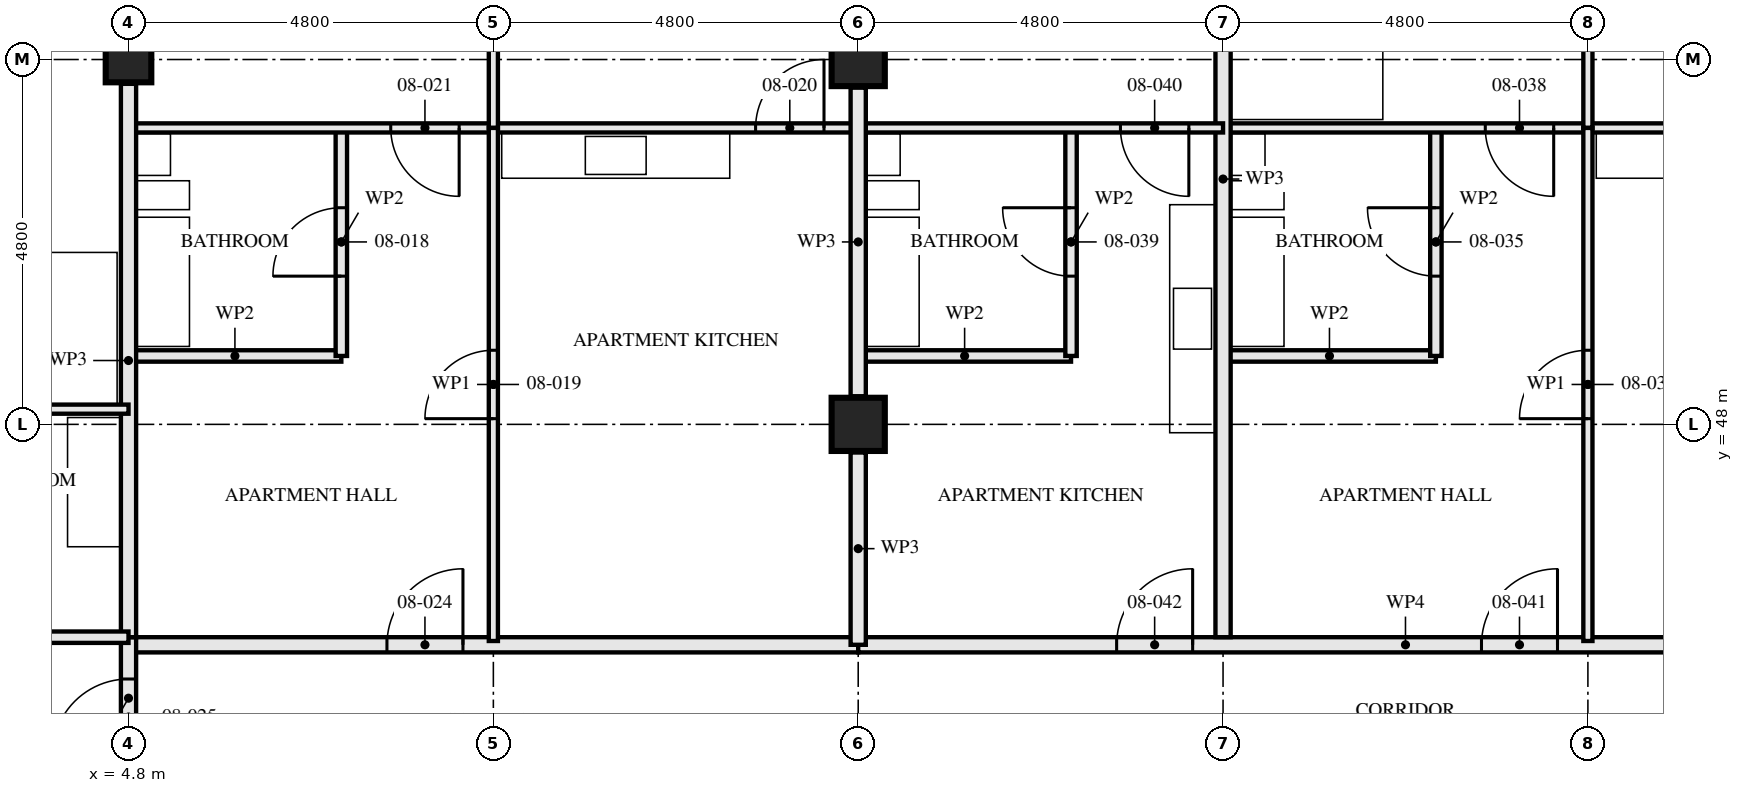
"""IFC4 building model, lengths in metres.
Left out: names, types, materials, properties, quantities, classifications, styles, units other than length and angle.
Written with IfcOpenShell. Run it as: python <this file> out.ifc"""

import sys

from ifc_helpers import new_model, si_unit, direction, frame, frame_2d, origin, origin_2d, place, context, subcontext, project, spatial, rectangle, hollow_rectangle, extrude, element, fill, save


model = new_model("IFC4")
c1 = context("Model", 3, precision=1e-05, world=origin(), true_north=direction((0.0, 1.0)))
c2 = subcontext(c1, "Body", "Model", "MODEL_VIEW")
j1 = project(units=[si_unit("LENGTHUNIT", "METRE"), si_unit("PLANEANGLEUNIT", "RADIAN")], contexts=[c1])
p1 = place(None, origin())
s1 = spatial("IfcSite", under=j1, at=p1, CompositionType="ELEMENT")
p2 = place(p1, origin())
s2 = spatial("IfcBuilding", under=s1, at=p2, CompositionType="ELEMENT")
p3 = place(p2, frame((0.0, 0.0, 34.0)))
s3 = spatial("IfcBuildingStorey", under=s2, at=p3, CompositionType="ELEMENT", Elevation=34.0)
p4 = place(p3, frame((4.8, 52.8, 0.0), z_axis=(0.0, 0.0, 1.0), x_axis=(0.0, 1.0, 0.0)))
e1 = element("IfcColumn", 1, at=p4, inside=s3, PredefinedType="COLUMN", context=c2, shape_type="SweptSolid", body=[
    extrude(hollow_rectangle(XDim=0.6, YDim=0.6, WallThickness=0.08, at=origin_2d()), origin(), (0.0, 0.0, 1.0), 3.5),
])
for number, where, z_axis, x_axis in (
    (2, (14.4, 48.0, 0.0), (0.0, 0.0, 1.0), (1.0, 0.0, 0.0)),
    (3, (14.4, 52.8, 0.0), (0.0, 0.0, 1.0), (1.0, 0.0, 0.0)),
):
    element("IfcColumn", number, at=place(p3, frame(where, z_axis=z_axis, x_axis=x_axis)), inside=s3, PredefinedType="COLUMN", context=c2, shape_type="SweptSolid", body=[
        extrude(hollow_rectangle(XDim=0.7, YDim=0.7, WallThickness=0.06, at=origin_2d()), origin(), (0.0, 0.0, 1.0), 3.5),
    ])
p5 = place(p3, frame((7.6, 51.9, 0.0), z_axis=(0.0, 0.0, 1.0), x_axis=(0.0, -1.0, 0.0)))
e4 = element("IfcWall", 4, at=p5, inside=s3, PredefinedType="PARTITIONING", context=c2, shape_type="SweptSolid", body=[
    extrude(rectangle(XDim=3.0, YDim=0.15, at=frame_2d((1.5, 0.0))), origin(), (0.0, 0.0, 1.0), 3.33),
])
p6 = place(p5, frame((1.05, 0.0, 0.0)))
e5 = element("IfcOpeningElement", 5, at=p6, cuts=e4, PredefinedType="OPENING", context=c2, shape_type="SweptSolid", body=[
    extrude(rectangle(XDim=0.9, YDim=2.1, at=frame_2d((0.45, 1.05))), frame((0.0, 0.085, 0.0), z_axis=(0.0, -1.0, 0.0), x_axis=(1.0, 0.0, 0.0)), (0.0, 0.0, 1.0), 0.171),
])
p7 = place(p3, frame((7.6, 48.9, 0.0), z_axis=(0.0, 0.0, 1.0), x_axis=(-1.0, 0.0, 0.0)))
e6 = element("IfcWall", 6, at=p7, inside=s3, PredefinedType="PARTITIONING", context=c2, shape_type="SweptSolid", body=[
    extrude(rectangle(XDim=2.8, YDim=0.15, at=frame_2d((1.4, 0.0))), origin(), (0.0, 0.0, 1.0), 3.33),
])
p8 = place(p3, frame((9.6, 51.9, 0.0), z_axis=(0.0, 0.0, 1.0), x_axis=(0.0, -1.0, 0.0)))
e7 = element("IfcWall", 7, at=p8, inside=s3, PredefinedType="PARTITIONING", context=c2, shape_type="SweptSolid", body=[
    extrude(rectangle(XDim=6.75, YDim=0.12, at=frame_2d((3.375, 0.0))), origin(), (0.0, 0.0, 1.0), 2.55),
])
p9 = place(p8, frame((2.925, 0.0, 0.0)))
e8 = element("IfcOpeningElement", 8, at=p9, cuts=e7, PredefinedType="OPENING", context=c2, shape_type="SweptSolid", body=[
    extrude(rectangle(XDim=0.9, YDim=2.1, at=frame_2d((0.45, 1.05))), frame((0.0, 0.071, 0.0), z_axis=(0.0, -1.0, 0.0), x_axis=(1.0, 0.0, 0.0)), (0.0, 0.0, 1.0), 0.141),
])
p10 = place(p3, frame((14.4, 51.9, 0.0), z_axis=(0.0, 0.0, 1.0), x_axis=(-1.0, 0.0, 0.0)))
e9 = element("IfcWall", 9, at=p10, inside=s3, PredefinedType="PARTITIONING", context=c2, shape_type="SweptSolid", body=[
    extrude(rectangle(XDim=4.8, YDim=0.12, at=frame_2d((2.4, 0.0))), origin(), (0.0, 0.0, 1.0), 3.33),
])
p11 = place(p10, frame((0.45, 0.0, 0.0)))
e10 = element("IfcOpeningElement", 10, at=p11, cuts=e9, PredefinedType="OPENING", context=c2, shape_type="SweptSolid", body=[
    extrude(rectangle(XDim=0.9, YDim=2.1, at=frame_2d((0.45, 1.05))), frame((0.0, 0.071, 0.0), z_axis=(0.0, -1.0, 0.0), x_axis=(1.0, 0.0, 0.0)), (0.0, 0.0, 1.0), 0.141),
])
p12 = place(p3, frame((9.6, 51.9, 0.0), z_axis=(0.0, 0.0, 1.0), x_axis=(-1.0, 0.0, 0.0)))
e11 = element("IfcWall", 11, at=p12, inside=s3, PredefinedType="PARTITIONING", context=c2, shape_type="SweptSolid", body=[
    extrude(rectangle(XDim=4.8, YDim=0.12, at=frame_2d((2.4, 0.0))), origin(), (0.0, 0.0, 1.0), 3.33),
])
p13 = place(p12, frame((0.45, 0.0, 0.0)))
e12 = element("IfcOpeningElement", 12, at=p13, cuts=e11, PredefinedType="OPENING", context=c2, shape_type="SweptSolid", body=[
    extrude(rectangle(XDim=0.9, YDim=2.1, at=frame_2d((0.45, 1.05))), frame((0.0, 0.071, 0.0), z_axis=(0.0, -1.0, 0.0), x_axis=(1.0, 0.0, 0.0)), (0.0, 0.0, 1.0), 0.141),
])
p14 = place(p3, frame((9.6, 57.28, 0.0), z_axis=(0.0, 0.0, 1.0), x_axis=(0.0, -1.0, 0.0)))
e13 = element("IfcWall", 13, at=p14, inside=s3, PredefinedType="PARTITIONING", context=c2, shape_type="SweptSolid", body=[
    extrude(rectangle(XDim=5.38, YDim=0.12, at=frame_2d((2.69, 0.0))), origin(), (0.0, 0.0, 1.0), 2.55),
])
p15 = place(p3, frame((4.8, 52.48, 0.0), z_axis=(0.0, 0.0, 1.0), x_axis=(0.0, -1.0, 0.0)))
e14 = element("IfcWall", 14, at=p15, inside=s3, PredefinedType="PARTITIONING", context=c2, shape_type="SweptSolid", body=[
    extrude(rectangle(XDim=7.28, YDim=0.2, at=frame_2d((3.64, 0.0))), origin(), (0.0, 0.0, 1.0), 2.55),
])
p16 = place(p3, frame((4.8, 45.2, 0.0), z_axis=(0.0, 0.0, 1.0), x_axis=(-1.0, 0.0, 0.0)))
e15 = element("IfcWall", 15, at=p16, inside=s3, PredefinedType="PARTITIONING", context=c2, shape_type="SweptSolid", body=[
    extrude(rectangle(XDim=2.8, YDim=0.15, at=frame_2d((1.4, 0.0))), origin(), (0.0, 0.0, 1.0), 3.33),
])
p17 = place(p3, frame((4.8, 48.2, 0.0), z_axis=(0.0, 0.0, 1.0), x_axis=(-1.0, 0.0, 0.0)))
e16 = element("IfcWall", 16, at=p17, inside=s3, PredefinedType="PARTITIONING", context=c2, shape_type="SweptSolid", body=[
    extrude(rectangle(XDim=4.48, YDim=0.12, at=frame_2d((2.24, 0.0))), origin(), (0.0, 0.0, 1.0), 3.33),
])
p18 = place(p17, frame((2.975, 0.0, 0.0)))
e17 = element("IfcOpeningElement", 17, at=p18, cuts=e16, PredefinedType="OPENING", context=c2, shape_type="SweptSolid", body=[
    extrude(rectangle(XDim=0.9, YDim=2.1, at=frame_2d((0.45, 1.05))), frame((0.0, 0.071, 0.0), z_axis=(0.0, -1.0, 0.0), x_axis=(1.0, 0.0, 0.0)), (0.0, 0.0, 1.0), 0.141),
])
p19 = place(p3, frame((14.4, 45.1, 0.0), z_axis=(0.0, 0.0, 1.0), x_axis=(-1.0, 0.0, 0.0)))
e18 = element("IfcWall", 18, at=p19, inside=s3, PredefinedType="PARTITIONING", context=c2, shape_type="SweptSolid", body=[
    extrude(rectangle(XDim=9.6, YDim=0.2, at=frame_2d((4.8, 0.0))), origin(), (0.0, 0.0, 1.0), 3.33),
])
p20 = place(p19, frame((5.2, 0.0, 0.0)))
e19 = element("IfcOpeningElement", 19, at=p20, cuts=e18, PredefinedType="OPENING", context=c2, shape_type="SweptSolid", body=[
    extrude(rectangle(XDim=1.0, YDim=2.1, at=frame_2d((0.5, 1.05))), frame((0.0, 0.111, 0.0), z_axis=(0.0, -1.0, 0.0), x_axis=(1.0, 0.0, 0.0)), (0.0, 0.0, 1.0), 0.221),
])
p21 = place(p3, frame((4.8, 45.2, 0.0), z_axis=(0.0, 0.0, 1.0), x_axis=(0.0, -1.0, 0.0)))
e20 = element("IfcWall", 20, at=p21, inside=s3, PredefinedType="PARTITIONING", context=c2, shape_type="SweptSolid", body=[
    extrude(rectangle(XDim=1.605, YDim=0.2, at=frame_2d((0.802, 0.0))), origin(), (0.0, 0.0, 1.0), 3.33),
])
p22 = place(p21, frame((0.55, 0.0, 0.0)))
e21 = element("IfcOpeningElement", 21, at=p22, cuts=e20, PredefinedType="OPENING", context=c2, shape_type="SweptSolid", body=[
    extrude(rectangle(XDim=1.0, YDim=2.1, at=frame_2d((0.5, 1.05))), frame((0.0, 0.111, 0.0), z_axis=(0.0, -1.0, 0.0), x_axis=(1.0, 0.0, 0.0)), (0.0, 0.0, 1.0), 0.221),
])
p23 = place(p3, frame((22.0, 51.9, 0.0), z_axis=(0.0, 0.0, 1.0), x_axis=(0.0, -1.0, 0.0)))
e22 = element("IfcWall", 22, at=p23, inside=s3, PredefinedType="PARTITIONING", context=c2, shape_type="SweptSolid", body=[
    extrude(rectangle(XDim=3.0, YDim=0.15, at=frame_2d((1.5, 0.0))), origin(), (0.0, 0.0, 1.0), 3.33),
])
p24 = place(p23, frame((1.05, 0.0, 0.0)))
e23 = element("IfcOpeningElement", 23, at=p24, cuts=e22, PredefinedType="OPENING", context=c2, shape_type="SweptSolid", body=[
    extrude(rectangle(XDim=0.9, YDim=2.1, at=frame_2d((0.45, 1.05))), frame((0.0, 0.085, 0.0), z_axis=(0.0, -1.0, 0.0), x_axis=(1.0, 0.0, 0.0)), (0.0, 0.0, 1.0), 0.171),
])
p25 = place(p3, frame((22.0, 48.9, 0.0), z_axis=(0.0, 0.0, 1.0), x_axis=(-1.0, 0.0, 0.0)))
e24 = element("IfcWall", 24, at=p25, inside=s3, PredefinedType="PARTITIONING", context=c2, shape_type="SweptSolid", body=[
    extrude(rectangle(XDim=2.8, YDim=0.15, at=frame_2d((1.4, 0.0))), origin(), (0.0, 0.0, 1.0), 3.33),
])
p26 = place(p3, frame((24.0, 51.9, 0.0), z_axis=(0.0, 0.0, 1.0), x_axis=(0.0, -1.0, 0.0)))
e25 = element("IfcWall", 25, at=p26, inside=s3, PredefinedType="PARTITIONING", context=c2, shape_type="SweptSolid", body=[
    extrude(rectangle(XDim=6.75, YDim=0.12, at=frame_2d((3.375, 0.0))), origin(), (0.0, 0.0, 1.0), 2.55),
])
p27 = place(p26, frame((2.925, 0.0, 0.0)))
e26 = element("IfcOpeningElement", 26, at=p27, cuts=e25, PredefinedType="OPENING", context=c2, shape_type="SweptSolid", body=[
    extrude(rectangle(XDim=0.9, YDim=2.1, at=frame_2d((0.45, 1.05))), frame((0.0, 0.071, 0.0), z_axis=(0.0, -1.0, 0.0), x_axis=(1.0, 0.0, 0.0)), (0.0, 0.0, 1.0), 0.141),
])
p28 = place(p3, frame((28.8, 51.9, 0.0), z_axis=(0.0, 0.0, 1.0), x_axis=(-1.0, 0.0, 0.0)))
e27 = element("IfcWall", 27, at=p28, inside=s3, PredefinedType="PARTITIONING", context=c2, shape_type="SweptSolid", body=[
    extrude(rectangle(XDim=4.8, YDim=0.12, at=frame_2d((2.4, 0.0))), origin(), (0.0, 0.0, 1.0), 3.33),
])
p29 = place(p28, frame((0.45, 0.0, 0.0)))
e28 = element("IfcOpeningElement", 28, at=p29, cuts=e27, PredefinedType="OPENING", context=c2, shape_type="SweptSolid", body=[
    extrude(rectangle(XDim=0.9, YDim=2.1, at=frame_2d((0.45, 1.05))), frame((0.0, 0.071, 0.0), z_axis=(0.0, -1.0, 0.0), x_axis=(1.0, 0.0, 0.0)), (0.0, 0.0, 1.0), 0.141),
])
p30 = place(p3, frame((24.0, 51.9, 0.0), z_axis=(0.0, 0.0, 1.0), x_axis=(-1.0, 0.0, 0.0)))
e29 = element("IfcWall", 29, at=p30, inside=s3, PredefinedType="PARTITIONING", context=c2, shape_type="SweptSolid", body=[
    extrude(rectangle(XDim=4.8, YDim=0.12, at=frame_2d((2.4, 0.0))), origin(), (0.0, 0.0, 1.0), 3.33),
])
p31 = place(p30, frame((0.45, 0.0, 0.0)))
e30 = element("IfcOpeningElement", 30, at=p31, cuts=e29, PredefinedType="OPENING", context=c2, shape_type="SweptSolid", body=[
    extrude(rectangle(XDim=0.9, YDim=2.1, at=frame_2d((0.45, 1.05))), frame((0.0, 0.071, 0.0), z_axis=(0.0, -1.0, 0.0), x_axis=(1.0, 0.0, 0.0)), (0.0, 0.0, 1.0), 0.141),
])
p32 = place(p3, frame((24.0, 57.255, 0.0), z_axis=(0.0, 0.0, 1.0), x_axis=(0.0, -1.0, 0.0)))
e31 = element("IfcWall", 31, at=p32, inside=s3, PredefinedType="PARTITIONING", context=c2, shape_type="SweptSolid", body=[
    extrude(rectangle(XDim=5.355, YDim=0.12, at=frame_2d((2.677, 0.0))), origin(), (0.0, 0.0, 1.0), 2.55),
])
p33 = place(p3, frame((19.2, 57.255, 0.0), z_axis=(0.0, 0.0, 1.0), x_axis=(0.0, -1.0, 0.0)))
e32 = element("IfcWall", 32, at=p33, inside=s3, PredefinedType="PARTITIONING", context=c2, shape_type="SweptSolid", body=[
    extrude(rectangle(XDim=12.055, YDim=0.2, at=frame_2d((6.027, 0.0))), origin(), (0.0, 0.0, 1.0), 2.55),
])
p34 = place(p3, frame((17.2, 51.9, 0.0), z_axis=(0.0, 0.0, 1.0), x_axis=(0.0, -1.0, 0.0)))
e33 = element("IfcWall", 33, at=p34, inside=s3, PredefinedType="PARTITIONING", context=c2, shape_type="SweptSolid", body=[
    extrude(rectangle(XDim=3.0, YDim=0.15, at=frame_2d((1.5, 0.0))), origin(), (0.0, 0.0, 1.0), 3.33),
])
p35 = place(p34, frame((1.05, 0.0, 0.0)))
e34 = element("IfcOpeningElement", 34, at=p35, cuts=e33, PredefinedType="OPENING", context=c2, shape_type="SweptSolid", body=[
    extrude(rectangle(XDim=0.9, YDim=2.1, at=frame_2d((0.45, 1.05))), frame((0.0, 0.085, 0.0), z_axis=(0.0, -1.0, 0.0), x_axis=(1.0, 0.0, 0.0)), (0.0, 0.0, 1.0), 0.171),
])
p36 = place(p3, frame((17.2, 48.9, 0.0), z_axis=(0.0, 0.0, 1.0), x_axis=(-1.0, 0.0, 0.0)))
e35 = element("IfcWall", 35, at=p36, inside=s3, PredefinedType="PARTITIONING", context=c2, shape_type="SweptSolid", body=[
    extrude(rectangle(XDim=2.8, YDim=0.15, at=frame_2d((1.4, 0.0))), origin(), (0.0, 0.0, 1.0), 3.33),
])
p37 = place(p3, frame((19.2, 51.9, 0.0), z_axis=(0.0, 0.0, 1.0), x_axis=(-1.0, 0.0, 0.0)))
e36 = element("IfcWall", 36, at=p37, inside=s3, PredefinedType="PARTITIONING", context=c2, shape_type="SweptSolid", body=[
    extrude(rectangle(XDim=4.8, YDim=0.12, at=frame_2d((2.4, 0.0))), origin(), (0.0, 0.0, 1.0), 3.33),
])
p38 = place(p37, frame((0.45, 0.0, 0.0)))
e37 = element("IfcOpeningElement", 37, at=p38, cuts=e36, PredefinedType="OPENING", context=c2, shape_type="SweptSolid", body=[
    extrude(rectangle(XDim=0.9, YDim=2.1, at=frame_2d((0.45, 1.05))), frame((0.0, 0.071, 0.0), z_axis=(0.0, -1.0, 0.0), x_axis=(1.0, 0.0, 0.0)), (0.0, 0.0, 1.0), 0.141),
])
p39 = place(p3, frame((28.8, 45.1, 0.0), z_axis=(0.0, 0.0, 1.0), x_axis=(-1.0, 0.0, 0.0)))
e38 = element("IfcWall", 38, at=p39, inside=s3, PredefinedType="PARTITIONING", context=c2, shape_type="SweptSolid", body=[
    extrude(rectangle(XDim=14.4, YDim=0.2, at=frame_2d((7.2, 0.0))), origin(), (0.0, 0.0, 1.0), 3.33),
])
p40 = place(p39, frame((5.2, 0.0, 0.0)))
e39 = element("IfcOpeningElement", 39, at=p40, cuts=e38, PredefinedType="OPENING", context=c2, shape_type="SweptSolid", body=[
    extrude(rectangle(XDim=1.0, YDim=2.1, at=frame_2d((0.5, 1.05))), frame((0.0, 0.111, 0.0), z_axis=(0.0, -1.0, 0.0), x_axis=(1.0, 0.0, 0.0)), (0.0, 0.0, 1.0), 0.221),
])
p41 = place(p39, frame((10.0, 0.0, 0.0)))
e40 = element("IfcOpeningElement", 40, at=p41, cuts=e38, PredefinedType="OPENING", context=c2, shape_type="SweptSolid", body=[
    extrude(rectangle(XDim=1.0, YDim=2.1, at=frame_2d((0.5, 1.05))), frame((0.0, 0.111, 0.0), z_axis=(0.0, -1.0, 0.0), x_axis=(1.0, 0.0, 0.0)), (0.0, 0.0, 1.0), 0.221),
])
p42 = place(p3, frame((14.4, 45.1, 0.0), z_axis=(0.0, 0.0, 1.0), x_axis=(0.0, 1.0, 0.0)))
e41 = element("IfcWall", 41, at=p42, inside=s3, PredefinedType="PARTITIONING", context=c2, shape_type="SweptSolid", body=[
    extrude(rectangle(XDim=2.53, YDim=0.2, at=frame_2d((1.265, 0.0))), origin(), (0.0, 0.0, 1.0), 2.32),
])
p43 = place(p3, frame((14.4, 48.37, 0.0), z_axis=(0.0, 0.0, 1.0), x_axis=(0.0, 1.0, 0.0)))
e42 = element("IfcWall", 42, at=p43, inside=s3, PredefinedType="PARTITIONING", context=c2, shape_type="SweptSolid", body=[
    extrude(rectangle(XDim=4.06, YDim=0.2, at=frame_2d((2.03, 0.0))), origin(), (0.0, 0.0, 1.0), 2.32),
])
p44 = place(p6, frame((0.9, 0.0, 0.0), z_axis=(0.0, 0.0, 1.0), x_axis=(-1.0, 0.0, 0.0)))
e43 = element("IfcDoor", 43, at=p44, inside=s3, OperationType="SINGLE_SWING_RIGHT", PredefinedType="DOOR", context=c2, shape_type="SweptSolid", body=[
    extrude(rectangle(XDim=0.9, YDim=2.1, at=frame_2d((0.45, 1.05))), frame((0.0, 0.022, 0.0), z_axis=(0.0, -1.0, 0.0), x_axis=(1.0, 0.0, 0.0)), (0.0, 0.0, 1.0), 0.044),
])
fill(e5, e43)
p45 = place(p9, frame((0.9, 0.0, 0.0), z_axis=(0.0, 0.0, 1.0), x_axis=(-1.0, 0.0, 0.0)))
e44 = element("IfcDoor", 44, at=p45, inside=s3, OperationType="SINGLE_SWING_RIGHT", PredefinedType="DOOR", context=c2, shape_type="SweptSolid", body=[
    extrude(rectangle(XDim=0.9, YDim=2.1, at=frame_2d((0.45, 1.05))), frame((0.0, 0.022, 0.0), z_axis=(0.0, -1.0, 0.0), x_axis=(1.0, 0.0, 0.0)), (0.0, 0.0, 1.0), 0.044),
])
fill(e8, e44)
p46 = place(p11, frame((0.9, 0.0, 0.0), z_axis=(0.0, 0.0, 1.0), x_axis=(-1.0, 0.0, 0.0)))
e45 = element("IfcDoor", 45, at=p46, inside=s3, OperationType="SINGLE_SWING_LEFT", PredefinedType="DOOR", context=c2, shape_type="SweptSolid", body=[
    extrude(rectangle(XDim=0.9, YDim=2.1, at=frame_2d((0.45, 1.05))), frame((0.0, 0.022, 0.0), z_axis=(0.0, -1.0, 0.0), x_axis=(1.0, 0.0, 0.0)), (0.0, 0.0, 1.0), 0.044),
])
fill(e10, e45)
p47 = place(p13, origin())
e46 = element("IfcDoor", 46, at=p47, inside=s3, OperationType="SINGLE_SWING_RIGHT", PredefinedType="DOOR", context=c2, shape_type="SweptSolid", body=[
    extrude(rectangle(XDim=0.9, YDim=2.1, at=frame_2d((0.45, 1.05))), frame((0.0, 0.022, 0.0), z_axis=(0.0, -1.0, 0.0), x_axis=(1.0, 0.0, 0.0)), (0.0, 0.0, 1.0), 0.044),
])
fill(e12, e46)
p48 = place(p20, frame((1.0, 0.0, 0.0), z_axis=(0.0, 0.0, 1.0), x_axis=(-1.0, 0.0, 0.0)))
e47 = element("IfcDoor", 47, at=p48, inside=s3, OperationType="SINGLE_SWING_LEFT", PredefinedType="DOOR", context=c2, shape_type="SweptSolid", body=[
    extrude(rectangle(XDim=1.0, YDim=2.1, at=frame_2d((0.5, 1.05))), frame((0.0, 0.027, 0.0), z_axis=(0.0, -1.0, 0.0), x_axis=(1.0, 0.0, 0.0)), (0.0, 0.0, 1.0), 0.054),
])
fill(e19, e47)
p49 = place(p22, frame((1.0, 0.0, 0.0), z_axis=(0.0, 0.0, 1.0), x_axis=(-1.0, 0.0, 0.0)))
e48 = element("IfcDoor", 48, at=p49, inside=s3, OperationType="SINGLE_SWING_RIGHT", PredefinedType="DOOR", context=c2, shape_type="SweptSolid", body=[
    extrude(rectangle(XDim=1.0, YDim=2.1, at=frame_2d((0.5, 1.05))), frame((0.0, 0.027, 0.0), z_axis=(0.0, -1.0, 0.0), x_axis=(1.0, 0.0, 0.0)), (0.0, 0.0, 1.0), 0.054),
])
fill(e21, e48)
p50 = place(p24, frame((0.9, 0.0, 0.0), z_axis=(0.0, 0.0, 1.0), x_axis=(-1.0, 0.0, 0.0)))
e49 = element("IfcDoor", 49, at=p50, inside=s3, OperationType="SINGLE_SWING_LEFT", PredefinedType="DOOR", context=c2, shape_type="SweptSolid", body=[
    extrude(rectangle(XDim=0.9, YDim=2.1, at=frame_2d((0.45, 1.05))), frame((0.0, 0.022, 0.0), z_axis=(0.0, -1.0, 0.0), x_axis=(1.0, 0.0, 0.0)), (0.0, 0.0, 1.0), 0.044),
])
fill(e23, e49)
p51 = place(p27, frame((0.9, 0.0, 0.0), z_axis=(0.0, 0.0, 1.0), x_axis=(-1.0, 0.0, 0.0)))
e50 = element("IfcDoor", 50, at=p51, inside=s3, OperationType="SINGLE_SWING_RIGHT", PredefinedType="DOOR", context=c2, shape_type="SweptSolid", body=[
    extrude(rectangle(XDim=0.9, YDim=2.1, at=frame_2d((0.45, 1.05))), frame((0.0, 0.022, 0.0), z_axis=(0.0, -1.0, 0.0), x_axis=(1.0, 0.0, 0.0)), (0.0, 0.0, 1.0), 0.044),
])
fill(e26, e50)
p52 = place(p31, origin())
e51 = element("IfcDoor", 51, at=p52, inside=s3, OperationType="SINGLE_SWING_RIGHT", PredefinedType="DOOR", context=c2, shape_type="SweptSolid", body=[
    extrude(rectangle(XDim=0.9, YDim=2.1, at=frame_2d((0.45, 1.05))), frame((0.0, 0.022, 0.0), z_axis=(0.0, -1.0, 0.0), x_axis=(1.0, 0.0, 0.0)), (0.0, 0.0, 1.0), 0.044),
])
fill(e30, e51)
p53 = place(p35, frame((0.9, 0.0, 0.0), z_axis=(0.0, 0.0, 1.0), x_axis=(-1.0, 0.0, 0.0)))
e52 = element("IfcDoor", 52, at=p53, inside=s3, OperationType="SINGLE_SWING_LEFT", PredefinedType="DOOR", context=c2, shape_type="SweptSolid", body=[
    extrude(rectangle(XDim=0.9, YDim=2.1, at=frame_2d((0.45, 1.05))), frame((0.0, 0.022, 0.0), z_axis=(0.0, -1.0, 0.0), x_axis=(1.0, 0.0, 0.0)), (0.0, 0.0, 1.0), 0.044),
])
fill(e34, e52)
p54 = place(p38, origin())
e53 = element("IfcDoor", 53, at=p54, inside=s3, OperationType="SINGLE_SWING_RIGHT", PredefinedType="DOOR", context=c2, shape_type="SweptSolid", body=[
    extrude(rectangle(XDim=0.9, YDim=2.1, at=frame_2d((0.45, 1.05))), frame((0.0, 0.022, 0.0), z_axis=(0.0, -1.0, 0.0), x_axis=(1.0, 0.0, 0.0)), (0.0, 0.0, 1.0), 0.044),
])
fill(e37, e53)
p55 = place(p40, frame((1.0, 0.0, 0.0), z_axis=(0.0, 0.0, 1.0), x_axis=(-1.0, 0.0, 0.0)))
e54 = element("IfcDoor", 54, at=p55, inside=s3, OperationType="SINGLE_SWING_LEFT", PredefinedType="DOOR", context=c2, shape_type="SweptSolid", body=[
    extrude(rectangle(XDim=1.0, YDim=2.1, at=frame_2d((0.5, 1.05))), frame((0.0, 0.027, 0.0), z_axis=(0.0, -1.0, 0.0), x_axis=(1.0, 0.0, 0.0)), (0.0, 0.0, 1.0), 0.054),
])
fill(e39, e54)
p56 = place(p41, frame((1.0, 0.0, 0.0), z_axis=(0.0, 0.0, 1.0), x_axis=(-1.0, 0.0, 0.0)))
e55 = element("IfcDoor", 55, at=p56, inside=s3, OperationType="SINGLE_SWING_LEFT", PredefinedType="DOOR", context=c2, shape_type="SweptSolid", body=[
    extrude(rectangle(XDim=1.0, YDim=2.1, at=frame_2d((0.5, 1.05))), frame((0.0, 0.027, 0.0), z_axis=(0.0, -1.0, 0.0), x_axis=(1.0, 0.0, 0.0)), (0.0, 0.0, 1.0), 0.054),
])
fill(e40, e55)
save(model, sys.argv[1])
